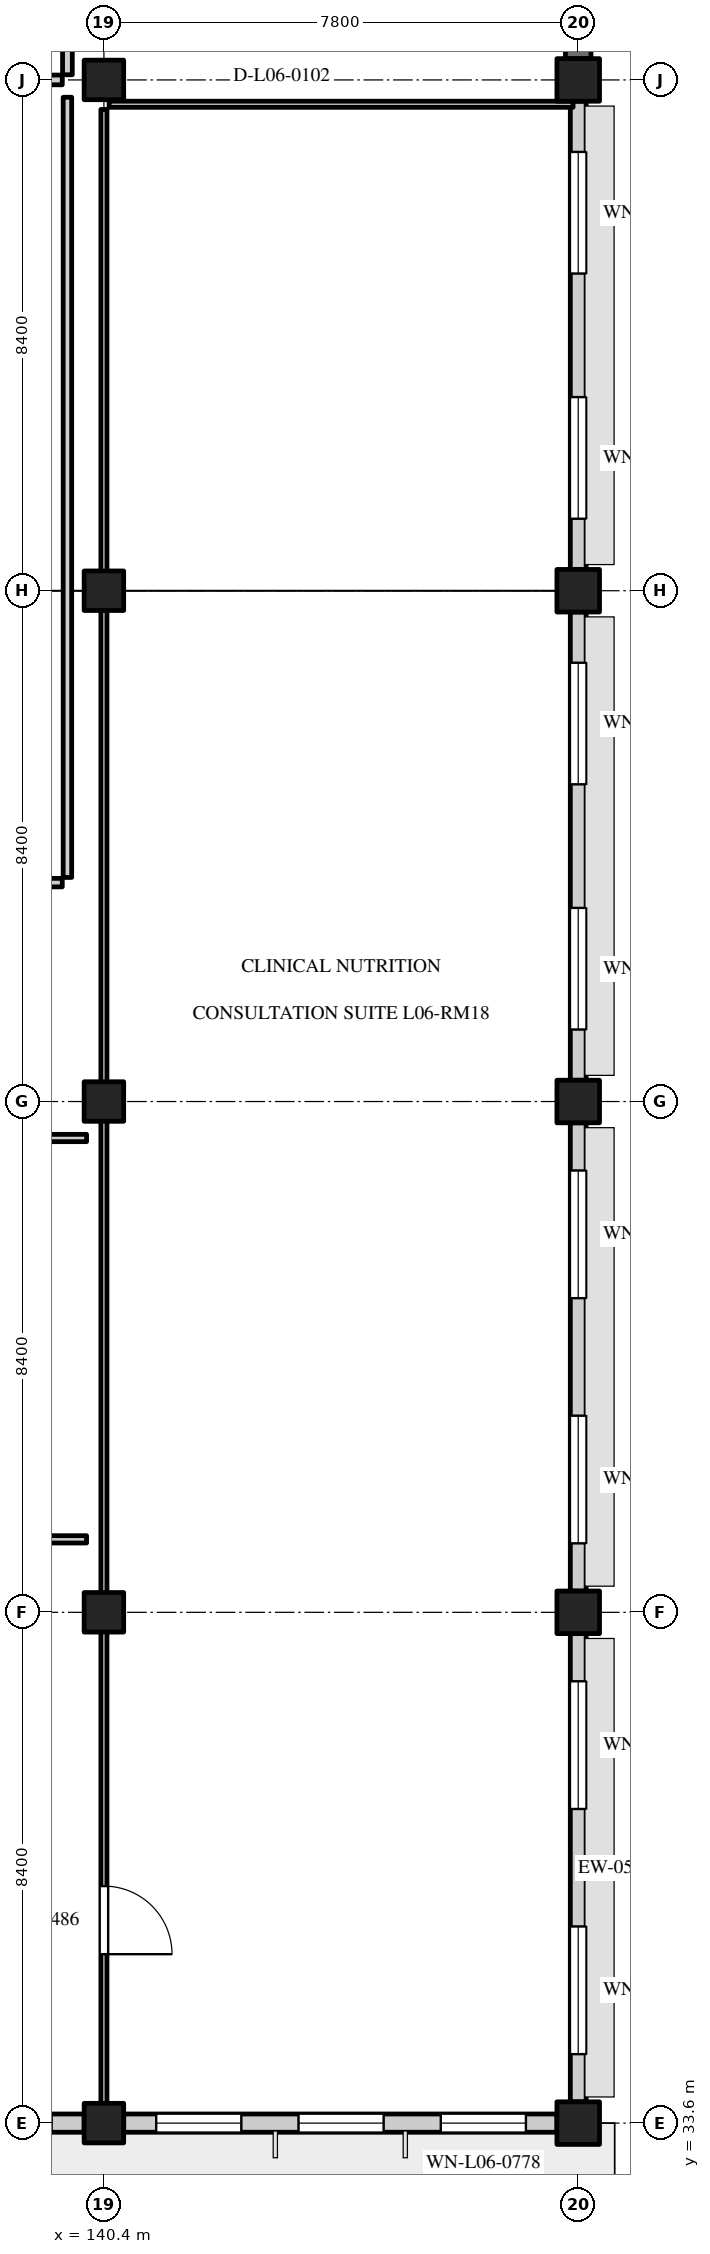
"""IFC4 building model, lengths in metres.
Left out: names, types, materials, properties, quantities, classifications, styles, units other than length and angle.
Written with IfcOpenShell. Run it as: python <this file> out.ifc"""

import sys

from ifc_helpers import new_model, si_unit, direction, frame, frame_2d, origin, origin_2d, place, context, subcontext, project, spatial, rectangle, extrude, element, fill, save


model = new_model("IFC4")
c1 = context("Model", 3, precision=1e-05, world=origin(), true_north=direction((0.0, 1.0)))
c2 = subcontext(c1, "Body", "Model", "MODEL_VIEW")
j1 = project(units=[si_unit("LENGTHUNIT", "METRE"), si_unit("PLANEANGLEUNIT", "RADIAN")], contexts=[c1])
p1 = place(None, origin())
s1 = spatial("IfcSite", under=j1, at=p1, CompositionType="ELEMENT")
p2 = place(p1, origin())
s2 = spatial("IfcBuilding", under=s1, at=p2, CompositionType="ELEMENT")
p3 = place(p2, frame((0.0, 0.0, 26.1)))
s3 = spatial("IfcBuildingStorey", under=s2, at=p3, CompositionType="ELEMENT", Elevation=26.1)
for number, where, z_axis, x_axis in (
    (1, (140.4, 33.6, 0.0), (0.0, 0.0, 1.0), (1.0, 0.0, 0.0)),
    (2, (140.4, 42.0, 0.0), (0.0, 0.0, 1.0), (1.0, 0.0, 0.0)),
    (3, (140.4, 50.4, 0.0), (0.0, 0.0, 1.0), (1.0, 0.0, 0.0)),
    (4, (140.4, 58.8, 0.0), (0.0, 0.0, 1.0), (1.0, 0.0, 0.0)),
    (5, (140.4, 67.2, 0.0), (0.0, 0.0, 1.0), (1.0, 0.0, 0.0)),
):
    element("IfcColumn", number, at=place(p3, frame(where, z_axis=z_axis, x_axis=x_axis)), inside=s3, PredefinedType="COLUMN", context=c2, shape_type="SweptSolid", body=[
        extrude(rectangle(XDim=0.65, YDim=0.65, at=origin_2d()), origin(), (0.0, 0.0, 1.0), 3.6),
    ])
for number, where, z_axis, x_axis in (
    (6, (148.2, 33.6, 0.0), (0.0, 0.0, 1.0), (1.0, 0.0, 0.0)),
    (7, (148.2, 42.0, 0.0), (0.0, 0.0, 1.0), (1.0, 0.0, 0.0)),
    (8, (148.2, 50.4, 0.0), (0.0, 0.0, 1.0), (1.0, 0.0, 0.0)),
    (9, (148.2, 58.8, 0.0), (0.0, 0.0, 1.0), (1.0, 0.0, 0.0)),
    (10, (148.2, 67.2, 0.0), (0.0, 0.0, 1.0), (1.0, 0.0, 0.0)),
):
    element("IfcColumn", number, at=place(p3, frame(where, z_axis=z_axis, x_axis=x_axis)), inside=s3, PredefinedType="COLUMN", context=c2, shape_type="SweptSolid", body=[
        extrude(rectangle(XDim=0.7, YDim=0.7, at=origin_2d()), origin(), (0.0, 0.0, 1.0), 3.6),
    ])
p4 = place(p3, frame((132.925, 33.6, 0.0), z_axis=(0.0, 0.0, 1.0), x_axis=(1.0, 0.0, 0.0)))
e11 = element("IfcWall", 11, at=p4, inside=s3, PredefinedType="STANDARD", context=c2, shape_type="SweptSolid", body=[
    extrude(rectangle(XDim=7.15, YDim=0.3, at=frame_2d((3.575, 0.0))), origin(), (0.0, 0.0, 1.0), 2.65),
])
p5 = place(p4, frame((0.355, 0.0, 0.8)))
e12 = element("IfcOpeningElement", 12, at=p5, cuts=e11, PredefinedType="OPENING", context=c2, shape_type="SweptSolid", body=[
    extrude(rectangle(XDim=1.2, YDim=1.55, at=frame_2d((0.6, 0.775))), frame((0.0, 0.162, 0.0), z_axis=(0.0, -1.0, 0.0), x_axis=(1.0, 0.0, 0.0)), (0.0, 0.0, 1.0), 0.324),
])
p6 = place(p4, frame((2.875, 0.0, 0.8)))
e13 = element("IfcOpeningElement", 13, at=p6, cuts=e11, PredefinedType="OPENING", context=c2, shape_type="SweptSolid", body=[
    extrude(rectangle(XDim=1.4, YDim=1.6, at=frame_2d((0.7, 0.8))), frame((0.0, 0.162, 0.0), z_axis=(0.0, -1.0, 0.0), x_axis=(1.0, 0.0, 0.0)), (0.0, 0.0, 1.0), 0.324),
])
p7 = place(p4, frame((5.215, 0.0, 0.8)))
e14 = element("IfcOpeningElement", 14, at=p7, cuts=e11, PredefinedType="OPENING", context=c2, shape_type="SweptSolid", body=[
    extrude(rectangle(XDim=1.4, YDim=1.6, at=frame_2d((0.7, 0.8))), frame((0.0, 0.162, 0.0), z_axis=(0.0, -1.0, 0.0), x_axis=(1.0, 0.0, 0.0)), (0.0, 0.0, 1.0), 0.324),
])
p8 = place(p3, frame((140.725, 33.6, 0.0), z_axis=(0.0, 0.0, 1.0), x_axis=(1.0, 0.0, 0.0)))
e15 = element("IfcWall", 15, at=p8, inside=s3, PredefinedType="STANDARD", context=c2, shape_type="SweptSolid", body=[
    extrude(rectangle(XDim=7.125, YDim=0.3, at=frame_2d((3.562, 0.0))), origin(), (0.0, 0.0, 1.0), 2.65),
])
p9 = place(p8, frame((0.535, 0.0, 0.8)))
e16 = element("IfcOpeningElement", 16, at=p9, cuts=e15, PredefinedType="OPENING", context=c2, shape_type="SweptSolid", body=[
    extrude(rectangle(XDim=1.4, YDim=1.45, at=frame_2d((0.7, 0.725))), frame((0.0, 0.162, 0.0), z_axis=(0.0, -1.0, 0.0), x_axis=(1.0, 0.0, 0.0)), (0.0, 0.0, 1.0), 0.324),
])
p10 = place(p8, frame((2.875, 0.0, 0.8)))
e17 = element("IfcOpeningElement", 17, at=p10, cuts=e15, PredefinedType="OPENING", context=c2, shape_type="SweptSolid", body=[
    extrude(rectangle(XDim=1.4, YDim=1.45, at=frame_2d((0.7, 0.725))), frame((0.0, 0.162, 0.0), z_axis=(0.0, -1.0, 0.0), x_axis=(1.0, 0.0, 0.0)), (0.0, 0.0, 1.0), 0.324),
])
p11 = place(p8, frame((5.215, 0.0, 0.8)))
e18 = element("IfcOpeningElement", 18, at=p11, cuts=e15, PredefinedType="OPENING", context=c2, shape_type="SweptSolid", body=[
    extrude(rectangle(XDim=1.4, YDim=1.45, at=frame_2d((0.7, 0.725))), frame((0.0, 0.162, 0.0), z_axis=(0.0, -1.0, 0.0), x_axis=(1.0, 0.0, 0.0)), (0.0, 0.0, 1.0), 0.324),
])
p12 = place(p3, frame((148.2, 33.95, 0.0), z_axis=(0.0, 0.0, 1.0), x_axis=(0.0, 1.0, 0.0)))
e19 = element("IfcWall", 19, at=p12, inside=s3, PredefinedType="STANDARD", context=c2, shape_type="SweptSolid", body=[
    extrude(rectangle(XDim=7.7, YDim=0.26, at=frame_2d((3.85, 0.0))), origin(), (0.0, 0.0, 1.0), 2.65),
])
p13 = place(p12, frame((0.784, 0.0, 0.8)))
e20 = element("IfcOpeningElement", 20, at=p13, cuts=e19, PredefinedType="OPENING", context=c2, shape_type="SweptSolid", body=[
    extrude(rectangle(XDim=2.1, YDim=1.55, at=frame_2d((1.05, 0.775))), frame((0.0, 0.142, 0.0), z_axis=(0.0, -1.0, 0.0), x_axis=(1.0, 0.0, 0.0)), (0.0, 0.0, 1.0), 0.284),
])
p14 = place(p12, frame((4.816, 0.0, 0.8)))
e21 = element("IfcOpeningElement", 21, at=p14, cuts=e19, PredefinedType="OPENING", context=c2, shape_type="SweptSolid", body=[
    extrude(rectangle(XDim=2.1, YDim=1.55, at=frame_2d((1.05, 0.775))), frame((0.0, 0.142, 0.0), z_axis=(0.0, -1.0, 0.0), x_axis=(1.0, 0.0, 0.0)), (0.0, 0.0, 1.0), 0.284),
])
p15 = place(p3, frame((148.2, 42.35, 0.0), z_axis=(0.0, 0.0, 1.0), x_axis=(0.0, 1.0, 0.0)))
e22 = element("IfcWall", 22, at=p15, inside=s3, PredefinedType="STANDARD", context=c2, shape_type="SweptSolid", body=[
    extrude(rectangle(XDim=7.7, YDim=0.26, at=frame_2d((3.85, 0.0))), origin(), (0.0, 0.0, 1.0), 2.65),
])
p16 = place(p15, frame((0.784, 0.0, 0.8)))
e23 = element("IfcOpeningElement", 23, at=p16, cuts=e22, PredefinedType="OPENING", context=c2, shape_type="SweptSolid", body=[
    extrude(rectangle(XDim=2.1, YDim=1.45, at=frame_2d((1.05, 0.725))), frame((0.0, 0.142, 0.0), z_axis=(0.0, -1.0, 0.0), x_axis=(1.0, 0.0, 0.0)), (0.0, 0.0, 1.0), 0.284),
])
p17 = place(p15, frame((4.816, 0.0, 0.8)))
e24 = element("IfcOpeningElement", 24, at=p17, cuts=e22, PredefinedType="OPENING", context=c2, shape_type="SweptSolid", body=[
    extrude(rectangle(XDim=2.1, YDim=1.45, at=frame_2d((1.05, 0.725))), frame((0.0, 0.142, 0.0), z_axis=(0.0, -1.0, 0.0), x_axis=(1.0, 0.0, 0.0)), (0.0, 0.0, 1.0), 0.284),
])
p18 = place(p3, frame((148.2, 50.75, 0.0), z_axis=(0.0, 0.0, 1.0), x_axis=(0.0, 1.0, 0.0)))
e25 = element("IfcWall", 25, at=p18, inside=s3, PredefinedType="STANDARD", context=c2, shape_type="SweptSolid", body=[
    extrude(rectangle(XDim=7.7, YDim=0.26, at=frame_2d((3.85, 0.0))), origin(), (0.0, 0.0, 1.0), 2.65),
])
p19 = place(p18, frame((0.834, 0.0, 0.8)))
e26 = element("IfcOpeningElement", 26, at=p19, cuts=e25, PredefinedType="OPENING", context=c2, shape_type="SweptSolid", body=[
    extrude(rectangle(XDim=2.0, YDim=1.55, at=frame_2d((1.0, 0.775))), frame((0.0, 0.142, 0.0), z_axis=(0.0, -1.0, 0.0), x_axis=(1.0, 0.0, 0.0)), (0.0, 0.0, 1.0), 0.284),
])
p20 = place(p18, frame((4.866, 0.0, 0.8)))
e27 = element("IfcOpeningElement", 27, at=p20, cuts=e25, PredefinedType="OPENING", context=c2, shape_type="SweptSolid", body=[
    extrude(rectangle(XDim=2.0, YDim=1.55, at=frame_2d((1.0, 0.775))), frame((0.0, 0.142, 0.0), z_axis=(0.0, -1.0, 0.0), x_axis=(1.0, 0.0, 0.0)), (0.0, 0.0, 1.0), 0.284),
])
p21 = place(p3, frame((148.2, 59.15, 0.0), z_axis=(0.0, 0.0, 1.0), x_axis=(0.0, 1.0, 0.0)))
e28 = element("IfcWall", 28, at=p21, inside=s3, PredefinedType="STANDARD", context=c2, shape_type="SweptSolid", body=[
    extrude(rectangle(XDim=7.7, YDim=0.26, at=frame_2d((3.85, 0.0))), origin(), (0.0, 0.0, 1.0), 2.65),
])
p22 = place(p21, frame((0.834, 0.0, 0.8)))
e29 = element("IfcOpeningElement", 29, at=p22, cuts=e28, PredefinedType="OPENING", context=c2, shape_type="SweptSolid", body=[
    extrude(rectangle(XDim=2.0, YDim=1.45, at=frame_2d((1.0, 0.725))), frame((0.0, 0.142, 0.0), z_axis=(0.0, -1.0, 0.0), x_axis=(1.0, 0.0, 0.0)), (0.0, 0.0, 1.0), 0.284),
])
p23 = place(p21, frame((4.866, 0.0, 0.8)))
e30 = element("IfcOpeningElement", 30, at=p23, cuts=e28, PredefinedType="OPENING", context=c2, shape_type="SweptSolid", body=[
    extrude(rectangle(XDim=2.0, YDim=1.45, at=frame_2d((1.0, 0.725))), frame((0.0, 0.142, 0.0), z_axis=(0.0, -1.0, 0.0), x_axis=(1.0, 0.0, 0.0)), (0.0, 0.0, 1.0), 0.284),
])
p24 = place(p3, frame((148.2, 67.55, 0.0), z_axis=(0.0, 0.0, 1.0), x_axis=(0.0, 1.0, 0.0)))
e31 = element("IfcWall", 31, at=p24, inside=s3, PredefinedType="SOLIDWALL", context=c2, shape_type="SweptSolid", body=[
    extrude(rectangle(XDim=7.7, YDim=0.42, at=frame_2d((3.85, 0.0))), origin(), (0.0, 0.0, 1.0), 2.65),
])
p25 = place(p24, frame((3.35, 0.0, 0.8)))
e32 = element("IfcOpeningElement", 32, at=p25, cuts=e31, PredefinedType="OPENING", context=c2, shape_type="SweptSolid", body=[
    extrude(rectangle(XDim=1.0, YDim=1.45, at=frame_2d((0.5, 0.725))), frame((0.0, 0.222, 0.0), z_axis=(0.0, -1.0, 0.0), x_axis=(1.0, 0.0, 0.0)), (0.0, 0.0, 1.0), 0.444),
])
p26 = place(p3, frame((128.085, 67.2, 0.0), z_axis=(0.0, 0.0, 1.0), x_axis=(1.0, 0.0, 0.0)))
e33 = element("IfcWall", 33, at=p26, inside=s3, PredefinedType="PARTITIONING", context=c2, shape_type="SweptSolid", body=[
    extrude(rectangle(XDim=11.63, YDim=0.16, at=frame_2d((5.815, 0.0))), origin(), (0.0, 0.0, 1.0), 3.28),
])
p27 = place(p26, frame((0.597, 0.0, 0.0)))
e34 = element("IfcOpeningElement", 34, at=p27, cuts=e33, PredefinedType="OPENING", context=c2, shape_type="SweptSolid", body=[
    extrude(rectangle(XDim=1.4, YDim=2.25, at=frame_2d((0.7, 1.125))), frame((0.0, 0.092, 0.0), z_axis=(0.0, -1.0, 0.0), x_axis=(1.0, 0.0, 0.0)), (0.0, 0.0, 1.0), 0.184),
])
p28 = place(p3, frame((139.8, 67.285, 0.0), z_axis=(0.0, 0.0, 1.0), x_axis=(0.0, 1.0, 0.0)))
e35 = element("IfcWall", 35, at=p28, inside=s3, PredefinedType="PARTITIONING", context=c2, shape_type="SweptSolid", body=[
    extrude(rectangle(XDim=8.03, YDim=0.16, at=frame_2d((4.015, 0.0))), origin(), (0.0, 0.0, 1.0), 3.28),
])
p29 = place(p3, frame((128.085, 54.0, 0.0), z_axis=(0.0, 0.0, 1.0), x_axis=(1.0, 0.0, 0.0)))
e36 = element("IfcWall", 36, at=p29, inside=s3, PredefinedType="PARTITIONING", context=c2, shape_type="SweptSolid", body=[
    extrude(rectangle(XDim=11.63, YDim=0.14, at=frame_2d((5.815, 0.0))), origin(), (0.0, 0.0, 1.0), 3.28),
])
p30 = place(p29, frame((1.971, 0.0, 0.0)))
e37 = element("IfcOpeningElement", 37, at=p30, cuts=e36, PredefinedType="OPENING", context=c2, shape_type="SweptSolid", body=[
    extrude(rectangle(XDim=1.2, YDim=2.15, at=frame_2d((0.6, 1.075))), frame((0.0, 0.082, 0.0), z_axis=(0.0, -1.0, 0.0), x_axis=(1.0, 0.0, 0.0)), (0.0, 0.0, 1.0), 0.164),
])
p31 = place(p3, frame((139.8, 54.085, 0.0), z_axis=(0.0, 0.0, 1.0), x_axis=(0.0, 1.0, 0.0)))
e38 = element("IfcWall", 38, at=p31, inside=s3, PredefinedType="PARTITIONING", context=c2, shape_type="SweptSolid", body=[
    extrude(rectangle(XDim=12.83, YDim=0.14, at=frame_2d((6.415, 0.0))), origin(), (0.0, 0.0, 1.0), 3.28),
])
p32 = place(p3, frame((140.4, 33.685, 0.0), z_axis=(0.0, 0.0, 1.0), x_axis=(0.0, 1.0, 0.0)))
e39 = element("IfcWall", 39, at=p32, inside=s3, PredefinedType="PARTITIONING", context=c2, shape_type="SweptSolid", body=[
    extrude(rectangle(XDim=33.03, YDim=0.1, at=frame_2d((16.515, 0.0))), origin(), (0.0, 0.0, 1.0), 3.28),
])
p33 = place(p32, frame((2.693, 0.0, 0.0)))
e40 = element("IfcOpeningElement", 40, at=p33, cuts=e39, PredefinedType="OPENING", context=c2, shape_type="SweptSolid", body=[
    extrude(rectangle(XDim=1.12, YDim=2.2, at=frame_2d((0.56, 1.1))), frame((0.0, 0.062, 0.0), z_axis=(0.0, -1.0, 0.0), x_axis=(1.0, 0.0, 0.0)), (0.0, 0.0, 1.0), 0.124),
])
p34 = place(p3, frame((140.485, 66.8, 0.0), z_axis=(0.0, 0.0, 1.0), x_axis=(1.0, 0.0, 0.0)))
e41 = element("IfcWall", 41, at=p34, inside=s3, PredefinedType="PARTITIONING", context=c2, shape_type="SweptSolid", body=[
    extrude(rectangle(XDim=7.63, YDim=0.1, at=frame_2d((3.815, 0.0))), origin(), (0.0, 0.0, 1.0), 3.28),
])
p35 = place(p3, frame((148.2, 41.69, 0.0), z_axis=(0.0, 0.0, 1.0), x_axis=(0.0, 1.0, 0.0)))
e42 = element("IfcWall", 42, at=p35, inside=s3, PredefinedType="PARTITIONING", context=c2, shape_type="SweptSolid", body=[
    extrude(rectangle(XDim=0.62, YDim=0.1, at=frame_2d((0.31, 0.0))), origin(), (0.0, 0.0, 1.0), 2.65),
])
p36 = place(p3, frame((148.2, 50.09, 0.0), z_axis=(0.0, 0.0, 1.0), x_axis=(0.0, 1.0, 0.0)))
e43 = element("IfcWall", 43, at=p36, inside=s3, PredefinedType="PARTITIONING", context=c2, shape_type="SweptSolid", body=[
    extrude(rectangle(XDim=0.62, YDim=0.1, at=frame_2d((0.31, 0.0))), origin(), (0.0, 0.0, 1.0), 2.65),
])
p37 = place(p3, frame((148.2, 58.49, 0.0), z_axis=(0.0, 0.0, 1.0), x_axis=(0.0, 1.0, 0.0)))
e44 = element("IfcWall", 44, at=p37, inside=s3, PredefinedType="PARTITIONING", context=c2, shape_type="SweptSolid", body=[
    extrude(rectangle(XDim=0.62, YDim=0.1, at=frame_2d((0.31, 0.0))), origin(), (0.0, 0.0, 1.0), 2.65),
])
p38 = place(p3, frame((134.885, 49.8, 0.0), z_axis=(0.0, 0.0, 1.0), x_axis=(1.0, 0.0, 0.0)))
e45 = element("IfcWall", 45, at=p38, inside=s3, PredefinedType="PARTITIONING", context=c2, shape_type="SweptSolid", body=[
    extrude(rectangle(XDim=5.23, YDim=0.12, at=frame_2d((2.615, 0.0))), origin(), (0.0, 0.0, 1.0), 3.28),
])
p39 = place(p38, frame((1.968, 0.0, 0.0)))
e46 = element("IfcOpeningElement", 46, at=p39, cuts=e45, PredefinedType="OPENING", context=c2, shape_type="SweptSolid", body=[
    extrude(rectangle(XDim=0.95, YDim=2.1, at=frame_2d((0.475, 1.05))), frame((0.0, 0.072, 0.0), z_axis=(0.0, -1.0, 0.0), x_axis=(1.0, 0.0, 0.0)), (0.0, 0.0, 1.0), 0.144),
])
p40 = place(p3, frame((134.885, 43.2, 0.0), z_axis=(0.0, 0.0, 1.0), x_axis=(1.0, 0.0, 0.0)))
e47 = element("IfcWall", 47, at=p40, inside=s3, PredefinedType="PARTITIONING", context=c2, shape_type="SweptSolid", body=[
    extrude(rectangle(XDim=5.23, YDim=0.12, at=frame_2d((2.615, 0.0))), origin(), (0.0, 0.0, 1.0), 3.28),
])
p41 = place(p9, origin())
e48 = element("IfcWindow", 48, at=p41, inside=s3, PartitioningType="SINGLE_PANEL", PredefinedType="WINDOW", context=c2, shape_type="SweptSolid", body=[
    extrude(rectangle(XDim=1.4, YDim=1.45, at=frame_2d((0.7, 0.725))), frame((0.0, 0.03, 0.0), z_axis=(0.0, -1.0, 0.0), x_axis=(1.0, 0.0, 0.0)), (0.0, 0.0, 1.0), 0.06),
])
fill(e16, e48)
p42 = place(p10, origin())
e49 = element("IfcWindow", 49, at=p42, inside=s3, PartitioningType="SINGLE_PANEL", PredefinedType="WINDOW", context=c2, shape_type="SweptSolid", body=[
    extrude(rectangle(XDim=1.4, YDim=1.45, at=frame_2d((0.7, 0.725))), frame((0.0, 0.03, 0.0), z_axis=(0.0, -1.0, 0.0), x_axis=(1.0, 0.0, 0.0)), (0.0, 0.0, 1.0), 0.06),
])
fill(e17, e49)
p43 = place(p11, origin())
e50 = element("IfcWindow", 50, at=p43, inside=s3, PartitioningType="SINGLE_PANEL", PredefinedType="WINDOW", context=c2, shape_type="SweptSolid", body=[
    extrude(rectangle(XDim=1.4, YDim=1.45, at=frame_2d((0.7, 0.725))), frame((0.0, 0.03, 0.0), z_axis=(0.0, -1.0, 0.0), x_axis=(1.0, 0.0, 0.0)), (0.0, 0.0, 1.0), 0.06),
])
fill(e18, e50)
p44 = place(p13, origin())
e51 = element("IfcWindow", 51, at=p44, inside=s3, PartitioningType="DOUBLE_PANEL_VERTICAL", PredefinedType="WINDOW", context=c2, shape_type="SweptSolid", body=[
    extrude(rectangle(XDim=2.1, YDim=1.55, at=frame_2d((1.05, 0.775))), frame((0.0, 0.03, 0.0), z_axis=(0.0, -1.0, 0.0), x_axis=(1.0, 0.0, 0.0)), (0.0, 0.0, 1.0), 0.06),
])
fill(e20, e51)
p45 = place(p14, origin())
e52 = element("IfcWindow", 52, at=p45, inside=s3, PartitioningType="DOUBLE_PANEL_VERTICAL", PredefinedType="WINDOW", context=c2, shape_type="SweptSolid", body=[
    extrude(rectangle(XDim=2.1, YDim=1.55, at=frame_2d((1.05, 0.775))), frame((0.0, 0.03, 0.0), z_axis=(0.0, -1.0, 0.0), x_axis=(1.0, 0.0, 0.0)), (0.0, 0.0, 1.0), 0.06),
])
fill(e21, e52)
p46 = place(p16, origin())
e53 = element("IfcWindow", 53, at=p46, inside=s3, PartitioningType="DOUBLE_PANEL_VERTICAL", PredefinedType="WINDOW", context=c2, shape_type="SweptSolid", body=[
    extrude(rectangle(XDim=2.1, YDim=1.45, at=frame_2d((1.05, 0.725))), frame((0.0, 0.03, 0.0), z_axis=(0.0, -1.0, 0.0), x_axis=(1.0, 0.0, 0.0)), (0.0, 0.0, 1.0), 0.06),
])
fill(e23, e53)
p47 = place(p17, origin())
e54 = element("IfcWindow", 54, at=p47, inside=s3, PartitioningType="DOUBLE_PANEL_VERTICAL", PredefinedType="WINDOW", context=c2, shape_type="SweptSolid", body=[
    extrude(rectangle(XDim=2.1, YDim=1.45, at=frame_2d((1.05, 0.725))), frame((0.0, 0.03, 0.0), z_axis=(0.0, -1.0, 0.0), x_axis=(1.0, 0.0, 0.0)), (0.0, 0.0, 1.0), 0.06),
])
fill(e24, e54)
p48 = place(p19, origin())
e55 = element("IfcWindow", 55, at=p48, inside=s3, PartitioningType="DOUBLE_PANEL_VERTICAL", PredefinedType="WINDOW", context=c2, shape_type="SweptSolid", body=[
    extrude(rectangle(XDim=2.0, YDim=1.55, at=frame_2d((1.0, 0.775))), frame((0.0, 0.03, 0.0), z_axis=(0.0, -1.0, 0.0), x_axis=(1.0, 0.0, 0.0)), (0.0, 0.0, 1.0), 0.06),
])
fill(e26, e55)
p49 = place(p20, origin())
e56 = element("IfcWindow", 56, at=p49, inside=s3, PartitioningType="DOUBLE_PANEL_VERTICAL", PredefinedType="WINDOW", context=c2, shape_type="SweptSolid", body=[
    extrude(rectangle(XDim=2.0, YDim=1.55, at=frame_2d((1.0, 0.775))), frame((0.0, 0.03, 0.0), z_axis=(0.0, -1.0, 0.0), x_axis=(1.0, 0.0, 0.0)), (0.0, 0.0, 1.0), 0.06),
])
fill(e27, e56)
p50 = place(p22, origin())
e57 = element("IfcWindow", 57, at=p50, inside=s3, PartitioningType="DOUBLE_PANEL_VERTICAL", PredefinedType="WINDOW", context=c2, shape_type="SweptSolid", body=[
    extrude(rectangle(XDim=2.0, YDim=1.45, at=frame_2d((1.0, 0.725))), frame((0.0, 0.03, 0.0), z_axis=(0.0, -1.0, 0.0), x_axis=(1.0, 0.0, 0.0)), (0.0, 0.0, 1.0), 0.06),
])
fill(e29, e57)
p51 = place(p23, origin())
e58 = element("IfcWindow", 58, at=p51, inside=s3, PartitioningType="DOUBLE_PANEL_VERTICAL", PredefinedType="WINDOW", context=c2, shape_type="SweptSolid", body=[
    extrude(rectangle(XDim=2.0, YDim=1.45, at=frame_2d((1.0, 0.725))), frame((0.0, 0.03, 0.0), z_axis=(0.0, -1.0, 0.0), x_axis=(1.0, 0.0, 0.0)), (0.0, 0.0, 1.0), 0.06),
])
fill(e30, e58)
p52 = place(p33, frame((1.12, 0.0, 0.0), z_axis=(0.0, 0.0, 1.0), x_axis=(-1.0, 0.0, 0.0)))
e59 = element("IfcDoor", 59, at=p52, inside=s3, OperationType="SINGLE_SWING_RIGHT", PredefinedType="DOOR", context=c2, shape_type="SweptSolid", body=[
    extrude(rectangle(XDim=1.12, YDim=2.2, at=frame_2d((0.56, 1.1))), frame((0.0, 0.025, 0.0), z_axis=(0.0, -1.0, 0.0), x_axis=(1.0, 0.0, 0.0)), (0.0, 0.0, 1.0), 0.05),
])
fill(e40, e59)
save(model, sys.argv[1])
